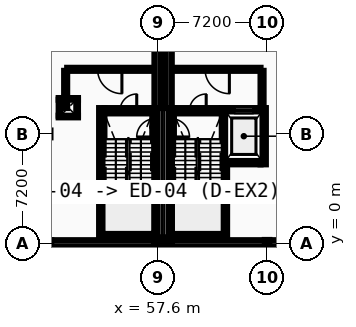
"""IFC4 building model, lengths in metres.
Left out: names, types, materials, properties, quantities, classifications, styles, units other than length and angle.
Written with IfcOpenShell. Run it as: python <this file> out.ifc"""

import sys

from ifc_helpers import new_model, si_unit, direction, frame, frame_2d, origin, origin_2d, place, context, subcontext, project, spatial, rectangle, i_section, extrude, element, fill, save


model = new_model("IFC4")
c1 = context("Model", 3, precision=1e-05, world=origin(), true_north=direction((0.0, 1.0)))
c2 = subcontext(c1, "Body", "Model", "MODEL_VIEW")
j1 = project(units=[si_unit("LENGTHUNIT", "METRE"), si_unit("PLANEANGLEUNIT", "RADIAN")], contexts=[c1])
p1 = place(None, origin())
s1 = spatial("IfcSite", under=j1, at=p1, CompositionType="ELEMENT")
p2 = place(p1, origin())
s2 = spatial("IfcBuilding", under=s1, at=p2, CompositionType="ELEMENT")
p3 = place(p2, origin())
s3 = spatial("IfcBuildingStorey", under=s2, at=p3, CompositionType="ELEMENT", Elevation=0.0)
for number, where, z_axis, x_axis in (
    (1, (57.6, 0.0, 0.0), (0.0, 0.0, 1.0), (1.0, 0.0, 0.0)),
    (2, (58.32, 0.0, 0.0), (0.0, 0.0, 1.0), (1.0, 0.0, 0.0)),
    (3, (64.8, 0.0, 0.0), (0.0, 0.0, 1.0), (1.0, 0.0, 0.0)),
):
    element("IfcColumn", number, at=place(p3, frame(where, z_axis=z_axis, x_axis=x_axis)), inside=s3, PredefinedType="COLUMN", context=c2, shape_type="SweptSolid", body=[
        extrude(i_section(OverallWidth=0.3, OverallDepth=0.45, WebThickness=0.014, FlangeThickness=0.026, FilletRadius=0.027, at=origin_2d()), origin(), (0.0, 0.0, 1.0), 5.2),
    ])
p4 = place(p3, frame((50.29, 0.0, 0.0), z_axis=(0.0, 0.0, 1.0), x_axis=(1.0, 0.0, 0.0)))
e4 = element("IfcWall", 4, at=p4, inside=s3, PredefinedType="STANDARD", context=c2, shape_type="SweptSolid", body=[
    extrude(rectangle(XDim=7.1, YDim=0.42, at=frame_2d((3.55, 0.0))), origin(), (0.0, 0.0, 1.0), 4.665),
])
p5 = place(p3, frame((57.6, -0.21, 0.0), z_axis=(0.0, 0.0, 1.0), x_axis=(0.0, 1.0, 0.0)))
e5 = element("IfcWall", 5, at=p5, inside=s3, PredefinedType="STANDARD", context=c2, shape_type="SweptSolid", body=[
    extrude(rectangle(XDim=0.61, YDim=0.42, at=frame_2d((0.305, 0.0))), origin(), (0.0, 0.0, 1.0), 4.97),
])
p6 = place(p3, frame((57.6, 8.9, 0.0), z_axis=(0.0, 0.0, 1.0), x_axis=(0.0, 1.0, 0.0)))
e6 = element("IfcWall", 6, at=p6, inside=s3, PredefinedType="STANDARD", context=c2, shape_type="SweptSolid", body=[
    extrude(rectangle(XDim=5.5, YDim=0.42, at=frame_2d((2.75, 0.0))), origin(), (0.0, 0.0, 1.0), 4.97),
])
p7 = place(p3, frame((58.53, 0.0, 0.0), z_axis=(0.0, 0.0, 1.0), x_axis=(1.0, 0.0, 0.0)))
e7 = element("IfcWall", 7, at=p7, inside=s3, PredefinedType="STANDARD", context=c2, shape_type="SweptSolid", body=[
    extrude(rectangle(XDim=6.27, YDim=0.42, at=frame_2d((3.135, 0.0))), origin(), (0.0, 0.0, 1.0), 4.665),
])
p8 = place(p3, frame((64.8, 0.0, 0.0), z_axis=(0.0, 0.0, 1.0), x_axis=(1.0, 0.0, 0.0)))
e8 = element("IfcWall", 8, at=p8, inside=s3, PredefinedType="STANDARD", context=c2, shape_type="SweptSolid", body=[
    extrude(rectangle(XDim=7.2, YDim=0.42, at=frame_2d((3.6, 0.0))), origin(), (0.0, 0.0, 1.0), 4.665),
])
p9 = place(p8, frame((4.25, 0.0, 0.0)))
e9 = element("IfcOpeningElement", 9, at=p9, cuts=e8, PredefinedType="OPENING", context=c2, shape_type="SweptSolid", body=[
    extrude(rectangle(XDim=2.1, YDim=2.4, at=frame_2d((1.05, 1.2))), frame((0.0, 0.22, 0.0), z_axis=(0.0, -1.0, 0.0), x_axis=(1.0, 0.0, 0.0)), (0.0, 0.0, 1.0), 0.44),
])
p10 = place(p3, frame((58.32, 0.4, 0.0), z_axis=(0.0, 0.0, 1.0), x_axis=(0.0, -1.0, 0.0)))
e10 = element("IfcWall", 10, at=p10, inside=s3, PredefinedType="STANDARD", context=c2, shape_type="SweptSolid", body=[
    extrude(rectangle(XDim=0.61, YDim=0.42, at=frame_2d((0.305, 0.0))), origin(), (0.0, 0.0, 1.0), 4.97),
])
p11 = place(p3, frame((58.32, 14.4, 0.0), z_axis=(0.0, 0.0, 1.0), x_axis=(0.0, -1.0, 0.0)))
e11 = element("IfcWall", 11, at=p11, inside=s3, PredefinedType="STANDARD", context=c2, shape_type="SweptSolid", body=[
    extrude(rectangle(XDim=5.5, YDim=0.42, at=frame_2d((2.75, 0.0))), origin(), (0.0, 0.0, 1.0), 4.97),
])
p12 = place(p3, frame((54.1, 0.575, 0.0), z_axis=(0.0, 0.0, 1.0), x_axis=(1.0, 0.0, 0.0)))
e12 = element("IfcWall", 12, at=p12, inside=s3, PredefinedType="SHEAR", context=c2, shape_type="SweptSolid", body=[
    extrude(rectangle(XDim=3.15, YDim=0.35, at=frame_2d((1.575, 0.0))), origin(), (0.0, 0.0, 1.0), 4.97),
])
p13 = place(p3, frame((54.1, 8.725, 0.0), z_axis=(0.0, 0.0, 1.0), x_axis=(1.0, 0.0, 0.0)))
e13 = element("IfcWall", 13, at=p13, inside=s3, PredefinedType="SHEAR", context=c2, shape_type="SweptSolid", body=[
    extrude(rectangle(XDim=3.15, YDim=0.35, at=frame_2d((1.575, 0.0))), origin(), (0.0, 0.0, 1.0), 4.97),
])
p14 = place(p13, frame((1.025, 0.0, 0.0)))
e14 = element("IfcOpeningElement", 14, at=p14, cuts=e13, PredefinedType="OPENING", context=c2, shape_type="SweptSolid", body=[
    extrude(rectangle(XDim=1.1, YDim=2.15, at=frame_2d((0.55, 1.075))), frame((0.0, 0.185, 0.0), z_axis=(0.0, -1.0, 0.0), x_axis=(1.0, 0.0, 0.0)), (0.0, 0.0, 1.0), 0.37),
])
p15 = place(p3, frame((53.925, 0.4, 0.0), z_axis=(0.0, 0.0, 1.0), x_axis=(0.0, 1.0, 0.0)))
e15 = element("IfcWall", 15, at=p15, inside=s3, PredefinedType="SHEAR", context=c2, shape_type="SweptSolid", body=[
    extrude(rectangle(XDim=8.5, YDim=0.35, at=frame_2d((4.25, 0.0))), origin(), (0.0, 0.0, 1.0), 4.97),
])
p16 = place(p3, frame((57.425, 0.4, 0.0), z_axis=(0.0, 0.0, 1.0), x_axis=(0.0, 1.0, 0.0)))
e16 = element("IfcWall", 16, at=p16, inside=s3, PredefinedType="SHEAR", context=c2, shape_type="SweptSolid", body=[
    extrude(rectangle(XDim=8.5, YDim=0.35, at=frame_2d((4.25, 0.0))), origin(), (0.0, 0.0, 1.0), 4.97),
])
p17 = place(p16, frame((6.6, 0.0, 0.0)))
e17 = element("IfcOpeningElement", 17, at=p17, cuts=e16, PredefinedType="OPENING", context=c2, shape_type="SweptSolid", body=[
    extrude(rectangle(XDim=1.2, YDim=2.15, at=frame_2d((0.6, 1.075))), frame((0.0, 0.185, 0.0), z_axis=(0.0, -1.0, 0.0), x_axis=(1.0, 0.0, 0.0)), (0.0, 0.0, 1.0), 0.37),
])
p18 = place(p3, frame((51.65, 11.45, 0.0), z_axis=(0.0, 0.0, 1.0), x_axis=(1.0, 0.0, 0.0)))
e18 = element("IfcWall", 18, at=p18, inside=s3, PredefinedType="PARTITIONING", context=c2, shape_type="SweptSolid", body=[
    extrude(rectangle(XDim=5.6, YDim=0.2, at=frame_2d((2.8, 0.0))), origin(), (0.0, 0.0, 1.0), 4.97),
])
p19 = place(p18, frame((2.0, 0.0, 0.0)))
e19 = element("IfcOpeningElement", 19, at=p19, cuts=e18, PredefinedType="OPENING", context=c2, shape_type="SweptSolid", body=[
    extrude(rectangle(XDim=1.6, YDim=2.2, at=frame_2d((0.8, 1.1))), frame((0.0, 0.11, 0.0), z_axis=(0.0, -1.0, 0.0), x_axis=(1.0, 0.0, 0.0)), (0.0, 0.0, 1.0), 0.22),
])
p20 = place(p3, frame((51.55, 8.9, 0.0), z_axis=(0.0, 0.0, 1.0), x_axis=(0.0, 1.0, 0.0)))
e20 = element("IfcWall", 20, at=p20, inside=s3, PredefinedType="PARTITIONING", context=c2, shape_type="SweptSolid", body=[
    extrude(rectangle(XDim=2.45, YDim=0.2, at=frame_2d((1.225, 0.0))), origin(), (0.0, 0.0, 1.0), 4.97),
])
p21 = place(p3, frame((58.67, 0.575, 0.0), z_axis=(0.0, 0.0, 1.0), x_axis=(1.0, 0.0, 0.0)))
e21 = element("IfcWall", 21, at=p21, inside=s3, PredefinedType="SHEAR", context=c2, shape_type="SweptSolid", body=[
    extrude(rectangle(XDim=3.15, YDim=0.35, at=frame_2d((1.575, 0.0))), origin(), (0.0, 0.0, 1.0), 4.97),
])
p22 = place(p3, frame((58.67, 8.725, 0.0), z_axis=(0.0, 0.0, 1.0), x_axis=(1.0, 0.0, 0.0)))
e22 = element("IfcWall", 22, at=p22, inside=s3, PredefinedType="SHEAR", context=c2, shape_type="SweptSolid", body=[
    extrude(rectangle(XDim=3.15, YDim=0.35, at=frame_2d((1.575, 0.0))), origin(), (0.0, 0.0, 1.0), 4.97),
])
p23 = place(p22, frame((1.025, 0.0, 0.0)))
e23 = element("IfcOpeningElement", 23, at=p23, cuts=e22, PredefinedType="OPENING", context=c2, shape_type="SweptSolid", body=[
    extrude(rectangle(XDim=1.1, YDim=2.15, at=frame_2d((0.55, 1.075))), frame((0.0, 0.185, 0.0), z_axis=(0.0, -1.0, 0.0), x_axis=(1.0, 0.0, 0.0)), (0.0, 0.0, 1.0), 0.37),
])
p24 = place(p3, frame((58.495, 0.4, 0.0), z_axis=(0.0, 0.0, 1.0), x_axis=(0.0, 1.0, 0.0)))
e24 = element("IfcWall", 24, at=p24, inside=s3, PredefinedType="SHEAR", context=c2, shape_type="SweptSolid", body=[
    extrude(rectangle(XDim=8.5, YDim=0.35, at=frame_2d((4.25, 0.0))), origin(), (0.0, 0.0, 1.0), 4.97),
])
p25 = place(p24, frame((6.6, 0.0, 0.0)))
e25 = element("IfcOpeningElement", 25, at=p25, cuts=e24, PredefinedType="OPENING", context=c2, shape_type="SweptSolid", body=[
    extrude(rectangle(XDim=1.2, YDim=2.15, at=frame_2d((0.6, 1.075))), frame((0.0, 0.185, 0.0), z_axis=(0.0, -1.0, 0.0), x_axis=(1.0, 0.0, 0.0)), (0.0, 0.0, 1.0), 0.37),
])
p26 = place(p3, frame((61.995, 0.4, 0.0), z_axis=(0.0, 0.0, 1.0), x_axis=(0.0, 1.0, 0.0)))
e26 = element("IfcWall", 26, at=p26, inside=s3, PredefinedType="SHEAR", context=c2, shape_type="SweptSolid", body=[
    extrude(rectangle(XDim=8.5, YDim=0.35, at=frame_2d((4.25, 0.0))), origin(), (0.0, 0.0, 1.0), 4.97),
])
p27 = place(p3, frame((62.17, 5.375, 0.0), z_axis=(0.0, 0.0, 1.0), x_axis=(1.0, 0.0, 0.0)))
e27 = element("IfcWall", 27, at=p27, inside=s3, PredefinedType="SHEAR", context=c2, shape_type="SweptSolid", body=[
    extrude(rectangle(XDim=2.2, YDim=0.35, at=frame_2d((1.1, 0.0))), origin(), (0.0, 0.0, 1.0), 4.97),
])
p28 = place(p3, frame((62.17, 8.725, 0.0), z_axis=(0.0, 0.0, 1.0), x_axis=(1.0, 0.0, 0.0)))
e28 = element("IfcWall", 28, at=p28, inside=s3, PredefinedType="SHEAR", context=c2, shape_type="SweptSolid", body=[
    extrude(rectangle(XDim=2.2, YDim=0.35, at=frame_2d((1.1, 0.0))), origin(), (0.0, 0.0, 1.0), 4.97),
])
p29 = place(p28, frame((0.5, 0.0, 0.0)))
e29 = element("IfcOpeningElement", 29, at=p29, cuts=e28, PredefinedType="OPENING", context=c2, shape_type="SweptSolid", body=[
    extrude(rectangle(XDim=1.2, YDim=2.2, at=frame_2d((0.6, 1.1))), frame((0.0, 0.185, 0.0), z_axis=(0.0, -1.0, 0.0), x_axis=(1.0, 0.0, 0.0)), (0.0, 0.0, 1.0), 0.37),
])
p30 = place(p3, frame((64.545, 5.2, 0.0), z_axis=(0.0, 0.0, 1.0), x_axis=(0.0, 1.0, 0.0)))
e30 = element("IfcWall", 30, at=p30, inside=s3, PredefinedType="SHEAR", context=c2, shape_type="SweptSolid", body=[
    extrude(rectangle(XDim=3.7, YDim=0.35, at=frame_2d((1.85, 0.0))), origin(), (0.0, 0.0, 1.0), 4.97),
])
p31 = place(p3, frame((58.67, 11.45, 0.0), z_axis=(0.0, 0.0, 1.0), x_axis=(1.0, 0.0, 0.0)))
e31 = element("IfcWall", 31, at=p31, inside=s3, PredefinedType="PARTITIONING", context=c2, shape_type="SweptSolid", body=[
    extrude(rectangle(XDim=5.7, YDim=0.2, at=frame_2d((2.85, 0.0))), origin(), (0.0, 0.0, 1.0), 4.97),
])
p32 = place(p31, frame((2.05, 0.0, 0.0)))
e32 = element("IfcOpeningElement", 32, at=p32, cuts=e31, PredefinedType="OPENING", context=c2, shape_type="SweptSolid", body=[
    extrude(rectangle(XDim=1.6, YDim=2.2, at=frame_2d((0.8, 1.1))), frame((0.0, 0.11, 0.0), z_axis=(0.0, -1.0, 0.0), x_axis=(1.0, 0.0, 0.0)), (0.0, 0.0, 1.0), 0.22),
])
p33 = place(p3, frame((64.47, 8.9, 0.0), z_axis=(0.0, 0.0, 1.0), x_axis=(0.0, 1.0, 0.0)))
e33 = element("IfcWall", 33, at=p33, inside=s3, PredefinedType="PARTITIONING", context=c2, shape_type="SweptSolid", body=[
    extrude(rectangle(XDim=2.45, YDim=0.2, at=frame_2d((1.225, 0.0))), origin(), (0.0, 0.0, 1.0), 4.97),
])
for number, where, z_axis, x_axis in (
    (34, (51.09, 8.345, 0.0), (0.0, 0.0, 1.0), (1.0, 0.0, 0.0)),
    (35, (51.09, 9.505, 0.0), (0.0, 0.0, 1.0), (1.0, 0.0, 0.0)),
):
    element("IfcWall", number, at=place(p3, frame(where, z_axis=z_axis, x_axis=x_axis)), inside=s3, PredefinedType="PARTITIONING", context=c2, shape_type="SweptSolid", body=[
        extrude(rectangle(XDim=1.27, YDim=0.11, at=frame_2d((0.635, 0.0))), origin(), (0.0, 0.0, 1.0), 4.97),
    ])
for number, where, z_axis, x_axis in (
    (36, (51.145, 8.4, 0.0), (0.0, 0.0, 1.0), (0.0, 1.0, 0.0)),
    (37, (52.305, 8.4, 0.0), (0.0, 0.0, 1.0), (0.0, 1.0, 0.0)),
):
    element("IfcWall", number, at=place(p3, frame(where, z_axis=z_axis, x_axis=x_axis)), inside=s3, PredefinedType="PARTITIONING", context=c2, shape_type="SweptSolid", body=[
        extrude(rectangle(XDim=1.05, YDim=0.11, at=frame_2d((0.525, 0.0))), origin(), (0.0, 0.0, 1.0), 4.97),
    ])
p34 = place(p14, frame((1.1, 0.0, 0.0), z_axis=(0.0, 0.0, 1.0), x_axis=(-1.0, 0.0, 0.0)))
e38 = element("IfcDoor", 38, at=p34, inside=s3, OperationType="SINGLE_SWING_RIGHT", PredefinedType="DOOR", context=c2, shape_type="SweptSolid", body=[
    extrude(rectangle(XDim=1.1, YDim=2.15, at=frame_2d((0.55, 1.075))), frame((0.0, 0.025, 0.0), z_axis=(0.0, -1.0, 0.0), x_axis=(1.0, 0.0, 0.0)), (0.0, 0.0, 1.0), 0.05),
])
fill(e14, e38)
p35 = place(p17, origin())
e39 = element("IfcDoor", 39, at=p35, inside=s3, OperationType="SINGLE_SWING_LEFT", PredefinedType="DOOR", context=c2, shape_type="SweptSolid", body=[
    extrude(rectangle(XDim=1.2, YDim=2.15, at=frame_2d((0.6, 1.075))), frame((0.0, 0.025, 0.0), z_axis=(0.0, -1.0, 0.0), x_axis=(1.0, 0.0, 0.0)), (0.0, 0.0, 1.0), 0.05),
])
fill(e17, e39)
p36 = place(p19, origin())
e40 = element("IfcDoor", 40, at=p36, inside=s3, OperationType="DOUBLE_DOOR_SINGLE_SWING", PredefinedType="DOOR", context=c2, shape_type="SweptSolid", body=[
    extrude(rectangle(XDim=1.6, YDim=2.2, at=frame_2d((0.8, 1.1))), frame((0.0, 0.025, 0.0), z_axis=(0.0, -1.0, 0.0), x_axis=(1.0, 0.0, 0.0)), (0.0, 0.0, 1.0), 0.05),
])
fill(e19, e40)
p37 = place(p23, frame((1.1, 0.0, 0.0), z_axis=(0.0, 0.0, 1.0), x_axis=(-1.0, 0.0, 0.0)))
e41 = element("IfcDoor", 41, at=p37, inside=s3, OperationType="SINGLE_SWING_RIGHT", PredefinedType="DOOR", context=c2, shape_type="SweptSolid", body=[
    extrude(rectangle(XDim=1.1, YDim=2.15, at=frame_2d((0.55, 1.075))), frame((0.0, 0.025, 0.0), z_axis=(0.0, -1.0, 0.0), x_axis=(1.0, 0.0, 0.0)), (0.0, 0.0, 1.0), 0.05),
])
fill(e23, e41)
p38 = place(p25, frame((1.2, 0.0, 0.0), z_axis=(0.0, 0.0, 1.0), x_axis=(-1.0, 0.0, 0.0)))
e42 = element("IfcDoor", 42, at=p38, inside=s3, OperationType="SINGLE_SWING_LEFT", PredefinedType="DOOR", context=c2, shape_type="SweptSolid", body=[
    extrude(rectangle(XDim=1.2, YDim=2.15, at=frame_2d((0.6, 1.075))), frame((0.0, 0.025, 0.0), z_axis=(0.0, -1.0, 0.0), x_axis=(1.0, 0.0, 0.0)), (0.0, 0.0, 1.0), 0.05),
])
fill(e25, e42)
p39 = place(p29, origin())
e43 = element("IfcDoor", 43, at=p39, inside=s3, OperationType="SLIDING_TO_RIGHT", PredefinedType="DOOR", context=c2, shape_type="SweptSolid", body=[
    extrude(rectangle(XDim=1.2, YDim=2.2, at=frame_2d((0.6, 1.1))), frame((0.0, 0.025, 0.0), z_axis=(0.0, -1.0, 0.0), x_axis=(1.0, 0.0, 0.0)), (0.0, 0.0, 1.0), 0.05),
])
fill(e29, e43)
p40 = place(p32, origin())
e44 = element("IfcDoor", 44, at=p40, inside=s3, OperationType="DOUBLE_DOOR_SINGLE_SWING", PredefinedType="DOOR", context=c2, shape_type="SweptSolid", body=[
    extrude(rectangle(XDim=1.6, YDim=2.2, at=frame_2d((0.8, 1.1))), frame((0.0, 0.025, 0.0), z_axis=(0.0, -1.0, 0.0), x_axis=(1.0, 0.0, 0.0)), (0.0, 0.0, 1.0), 0.05),
])
fill(e32, e44)
save(model, sys.argv[1])
